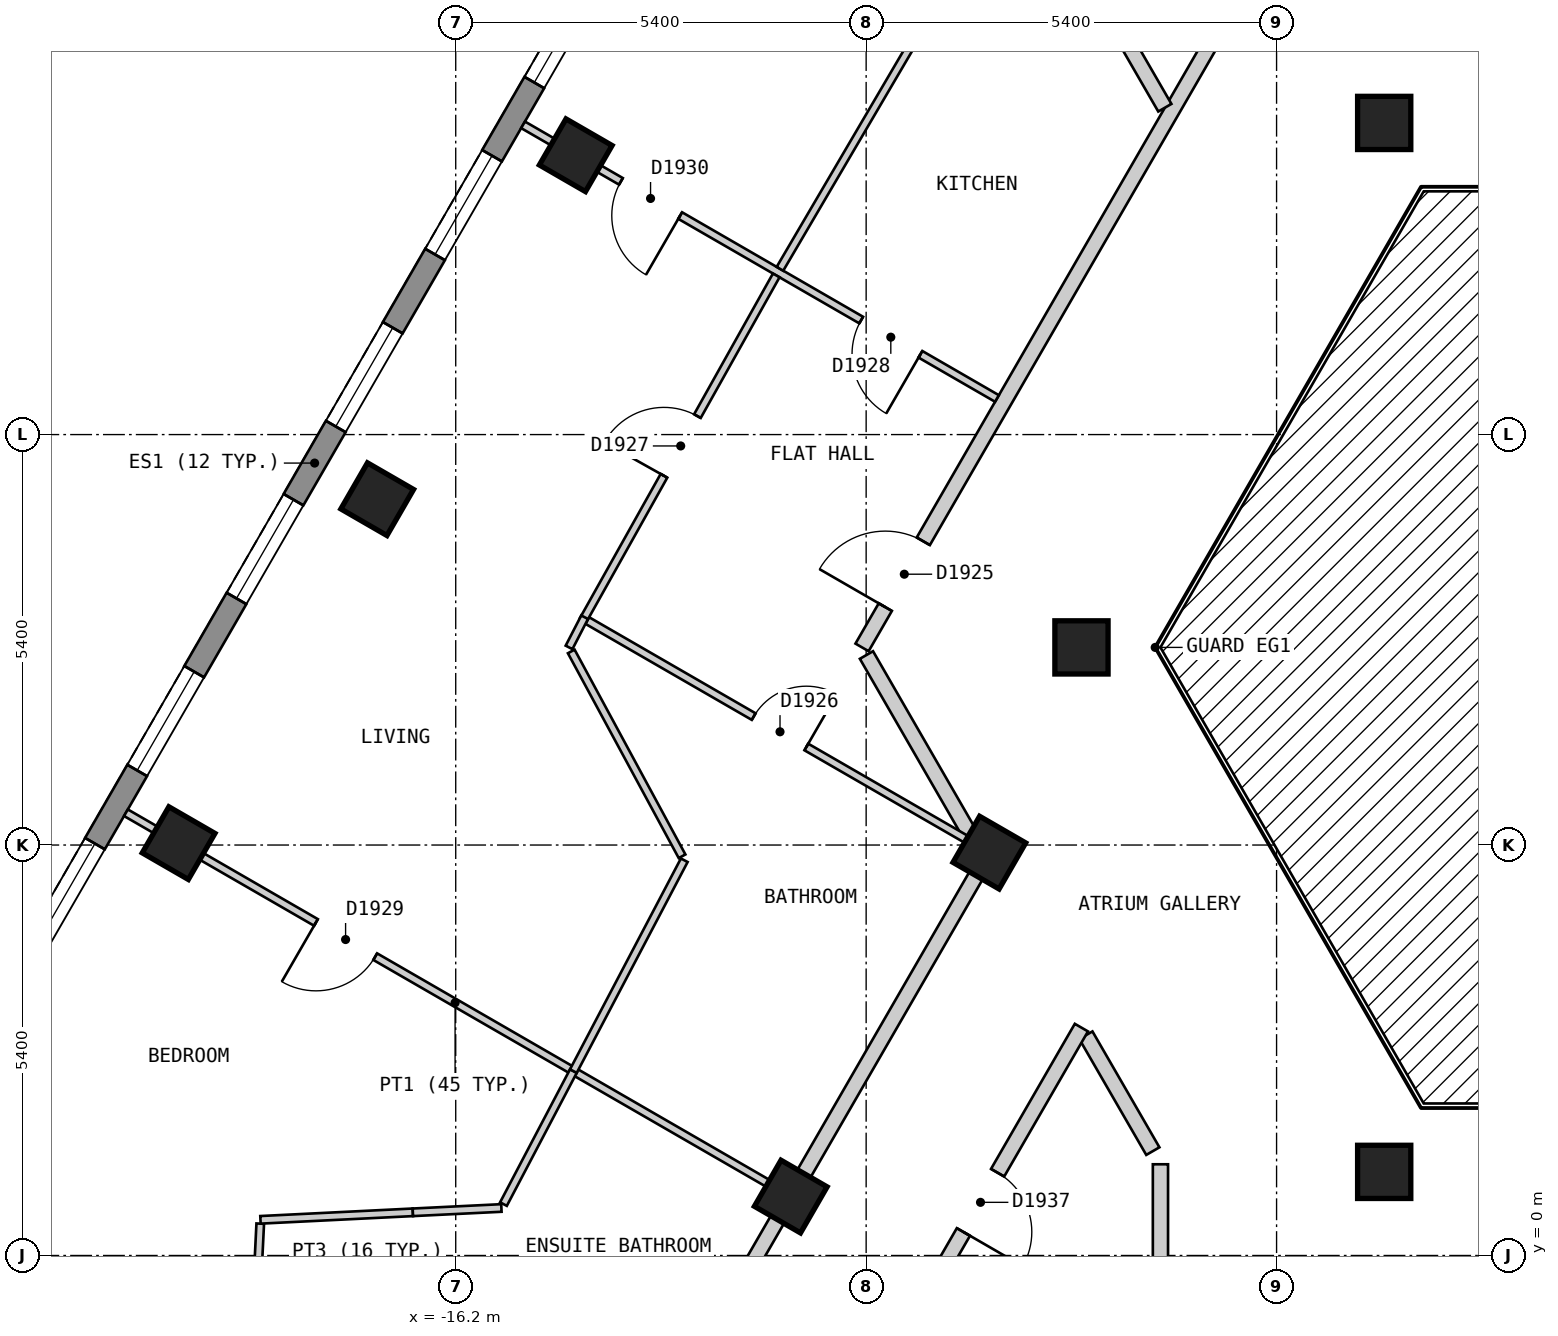
"""IFC4 building model, lengths in metres.
Left out: names, types, materials, properties, quantities, classifications, styles, units other than length and angle.
Written with IfcOpenShell. Run it as: python <this file> out.ifc"""

import sys

from ifc_helpers import new_model, si_unit, direction, frame, frame_2d, origin, origin_2d, place, context, subcontext, project, spatial, polyline, rectangle, outline, extrude, element, fill, save


model = new_model("IFC4")
c1 = context("Model", 3, precision=1e-05, world=origin(), true_north=direction((0.0, 1.0)))
c2 = subcontext(c1, "Body", "Model", "MODEL_VIEW")
j1 = project(units=[si_unit("LENGTHUNIT", "METRE"), si_unit("PLANEANGLEUNIT", "RADIAN")], contexts=[c1])
p1 = place(None, origin())
s1 = spatial("IfcSite", under=j1, at=p1, CompositionType="ELEMENT")
p2 = place(p1, origin())
s2 = spatial("IfcBuilding", under=s1, at=p2, CompositionType="ELEMENT")
p3 = place(p2, frame((0.0, 0.0, 226.8)))
s3 = spatial("IfcBuildingStorey", under=s2, at=p3, CompositionType="ELEMENT", Elevation=226.8)
for number, where, z_axis, x_axis in (
    (1, (-14.621, 14.475, 0.0), (0.0, 0.0, 1.0), (-0.5, -0.866, 0.0)),
    (2, (-17.233, 9.95, 0.0), (0.0, 0.0, 1.0), (-0.5, -0.866, 0.0)),
    (3, (-19.846, 5.425, 0.0), (0.0, 0.0, 1.0), (-0.5, -0.866, 0.0)),
    (4, (-3.984, 14.9, 0.0), (0.0, 0.0, 1.0), (1.0, 0.0, 0.0)),
    (5, (-7.967, 8.0, 0.0), (0.0, 0.0, 1.0), (1.0, 0.0, 0.0)),
    (6, (-9.179, 5.3, 0.0), (0.0, 0.0, 1.0), (-0.5, -0.866, 0.0)),
    (7, (-3.984, 1.1, 0.0), (0.0, 0.0, 1.0), (1.0, 0.0, 0.0)),
    (8, (-11.792, 0.775, 0.0), (0.0, 0.0, 1.0), (-0.5, -0.866, 0.0)),
):
    element("IfcColumn", number, at=place(p3, frame(where, z_axis=z_axis, x_axis=x_axis)), inside=s3, PredefinedType="COLUMN", context=c2, shape_type="SweptSolid", body=[
        extrude(rectangle(XDim=0.7, YDim=0.7, at=origin_2d()), origin(), (0.0, 0.0, 1.0), 3.0),
    ])
p4 = place(p3, frame((-12.514, 20.025, 0.0), z_axis=(0.0, 0.0, 1.0), x_axis=(-0.500003656944, -0.866023292436, 0.0)))
e9 = element("IfcWall", 9, at=p4, inside=s3, PredefinedType="SOLIDWALL", context=c2, shape_type="SweptSolid", body=[
    extrude(outline(polyline([(0.0, -0.15), (22.17, -0.15), (22.09, 0.15), (0.08, 0.15), (0.0, -0.15)])), origin(), (0.0, 0.0, 1.0), 2.7),
])
p5 = place(p4, frame((1.191, 0.0, 0.15)))
e10 = element("IfcOpeningElement", 10, at=p5, cuts=e9, PredefinedType="OPENING", context=c2, shape_type="SweptSolid", body=[
    extrude(rectangle(XDim=1.5, YDim=2.1, at=frame_2d((0.75, 1.05))), frame((0.0, 0.16, 0.0), z_axis=(0.0, -1.0, 0.0), x_axis=(1.0, 0.0, 0.0)), (0.0, 0.0, 1.0), 0.32),
])
p6 = place(p4, frame((3.804, 0.0, 0.15)))
e11 = element("IfcOpeningElement", 11, at=p6, cuts=e9, PredefinedType="OPENING", context=c2, shape_type="SweptSolid", body=[
    extrude(rectangle(XDim=1.5, YDim=2.1, at=frame_2d((0.75, 1.05))), frame((0.0, 0.16, 0.0), z_axis=(0.0, -1.0, 0.0), x_axis=(1.0, 0.0, 0.0)), (0.0, 0.0, 1.0), 0.32),
])
p7 = place(p4, frame((6.416, 0.0, 0.15)))
e12 = element("IfcOpeningElement", 12, at=p7, cuts=e9, PredefinedType="OPENING", context=c2, shape_type="SweptSolid", body=[
    extrude(rectangle(XDim=1.5, YDim=2.1, at=frame_2d((0.75, 1.05))), frame((0.0, 0.16, 0.0), z_axis=(0.0, -1.0, 0.0), x_axis=(1.0, 0.0, 0.0)), (0.0, 0.0, 1.0), 0.32),
])
p8 = place(p4, frame((9.029, 0.0, 0.15)))
e13 = element("IfcOpeningElement", 13, at=p8, cuts=e9, PredefinedType="OPENING", context=c2, shape_type="SweptSolid", body=[
    extrude(rectangle(XDim=1.5, YDim=2.1, at=frame_2d((0.75, 1.05))), frame((0.0, 0.16, 0.0), z_axis=(0.0, -1.0, 0.0), x_axis=(1.0, 0.0, 0.0)), (0.0, 0.0, 1.0), 0.32),
])
p9 = place(p4, frame((11.641, 0.0, 0.15)))
e14 = element("IfcOpeningElement", 14, at=p9, cuts=e9, PredefinedType="OPENING", context=c2, shape_type="SweptSolid", body=[
    extrude(rectangle(XDim=1.5, YDim=2.1, at=frame_2d((0.75, 1.05))), frame((0.0, 0.16, 0.0), z_axis=(0.0, -1.0, 0.0), x_axis=(1.0, 0.0, 0.0)), (0.0, 0.0, 1.0), 0.32),
])
p10 = place(p4, frame((14.254, 0.0, 0.15)))
e15 = element("IfcOpeningElement", 15, at=p10, cuts=e9, PredefinedType="OPENING", context=c2, shape_type="SweptSolid", body=[
    extrude(rectangle(XDim=1.5, YDim=2.1, at=frame_2d((0.75, 1.05))), frame((0.0, 0.16, 0.0), z_axis=(0.0, -1.0, 0.0), x_axis=(1.0, 0.0, 0.0)), (0.0, 0.0, 1.0), 0.32),
])
p11 = place(p4, frame((16.866, 0.0, 0.15)))
e16 = element("IfcOpeningElement", 16, at=p11, cuts=e9, PredefinedType="OPENING", context=c2, shape_type="SweptSolid", body=[
    extrude(rectangle(XDim=1.5, YDim=2.1, at=frame_2d((0.75, 1.05))), frame((0.0, 0.16, 0.0), z_axis=(0.0, -1.0, 0.0), x_axis=(1.0, 0.0, 0.0)), (0.0, 0.0, 1.0), 0.32),
])
p12 = place(p4, frame((19.479, 0.0, 0.15)))
e17 = element("IfcOpeningElement", 17, at=p12, cuts=e9, PredefinedType="OPENING", context=c2, shape_type="SweptSolid", body=[
    extrude(rectangle(XDim=1.5, YDim=2.1, at=frame_2d((0.75, 1.05))), frame((0.0, 0.16, 0.0), z_axis=(0.0, -1.0, 0.0), x_axis=(1.0, 0.0, 0.0)), (0.0, 0.0, 1.0), 0.32),
])
p13 = place(p3, frame((-10.796, 7.9, 0.0), z_axis=(0.0, 0.0, 1.0), x_axis=(0.499674397761, -0.866213308731, 0.0)))
e18 = element("IfcWall", 18, at=p13, inside=s3, PredefinedType="PARTITIONING", context=c2, shape_type="SweptSolid", body=[
    extrude(rectangle(XDim=2.785, YDim=0.2, at=frame_2d((1.393, 0.0))), origin(), (0.0, 0.0, 1.0), 2.7),
])
p14 = place(p3, frame((-7.909, 2.898, 0.0), z_axis=(0.0, 0.0, 1.0), x_axis=(0.50019444547, -0.865913111531, 0.0)))
e19 = element("IfcWall", 19, at=p14, inside=s3, PredefinedType="PARTITIONING", context=c2, shape_type="SweptSolid", body=[
    extrude(rectangle(XDim=1.761, YDim=0.2, at=frame_2d((0.88, 0.0))), origin(), (0.0, 0.0, 1.0), 2.7),
])
p15 = place(p3, frame((-10.623, -1.6, 0.0), z_axis=(0.0, 0.0, 1.0), x_axis=(0.500040865889, 0.866001808567, 0.0)))
e20 = element("IfcWall", 20, at=p15, inside=s3, PredefinedType="PARTITIONING", context=c2, shape_type="SweptSolid", body=[
    extrude(rectangle(XDim=5.31, YDim=0.2, at=frame_2d((2.655, 0.0))), origin(), (0.0, 0.0, 1.0), 2.7),
])
p16 = place(p15, frame((2.205, 0.0, 0.0)))
e21 = element("IfcOpeningElement", 21, at=p16, cuts=e20, PredefinedType="OPENING", context=c2, shape_type="SweptSolid", body=[
    extrude(rectangle(XDim=0.9, YDim=2.1, at=frame_2d((0.45, 1.05))), frame((0.0, 0.11, 0.0), z_axis=(0.0, -1.0, 0.0), x_axis=(1.0, 0.0, 0.0)), (0.0, 0.0, 1.0), 0.22),
])
p17 = place(p3, frame((-13.106, -1.5, 0.0), z_axis=(0.0, 0.0, 1.0), x_axis=(0.500025705601, 0.86601056214, 0.0)))
e22 = element("IfcWall", 22, at=p17, inside=s3, PredefinedType="PARTITIONING", context=c2, shape_type="SweptSolid", body=[
    extrude(rectangle(XDim=7.735, YDim=0.2, at=frame_2d((3.868, 0.0))), origin(), (0.0, 0.0, 1.0), 2.7),
])
p18 = place(p3, frame((-10.854, 8.0, 0.0), z_axis=(0.0, 0.0, 1.0), x_axis=(0.499997637144, 0.866026767976, 0.0)))
e23 = element("IfcWall", 23, at=p18, inside=s3, PredefinedType="PARTITIONING", context=c2, shape_type="SweptSolid", body=[
    extrude(rectangle(XDim=10.854, YDim=0.2, at=frame_2d((5.427, 0.0))), origin(), (0.0, 0.0, 1.0), 2.7),
])
p19 = place(p18, frame((0.612, 0.0, 0.0)))
e24 = element("IfcOpeningElement", 24, at=p19, cuts=e23, PredefinedType="OPENING", context=c2, shape_type="SweptSolid", body=[
    extrude(rectangle(XDim=1.0, YDim=2.1, at=frame_2d((0.5, 1.05))), frame((0.0, 0.11, 0.0), z_axis=(0.0, -1.0, 0.0), x_axis=(1.0, 0.0, 0.0)), (0.0, 0.0, 1.0), 0.22),
])
p20 = place(p3, frame((-6.928, -2.799, 0.0), z_axis=(0.0, 0.0, 1.0), x_axis=(0.0, 1.0, 0.0)))
e25 = element("IfcWall", 25, at=p20, inside=s3, PredefinedType="PARTITIONING", context=c2, shape_type="SweptSolid", body=[
    extrude(rectangle(XDim=3.999, YDim=0.2, at=frame_2d((2.0, 0.0))), origin(), (0.0, 0.0, 1.0), 2.7),
])
p21 = place(p3, frame((-14.68, 7.947, 0.0), z_axis=(0.0, 0.0, 1.0), x_axis=(0.475823637798, -0.879540712936, 0.0)))
e26 = element("IfcWall", 26, at=p21, inside=s3, PredefinedType="PARTITIONING", context=c2, shape_type="SweptSolid", body=[
    extrude(rectangle(XDim=3.064, YDim=0.1, at=frame_2d((1.532, 0.0))), origin(), (0.0, 0.0, 1.0), 2.7),
])
p22 = place(p3, frame((-20.539, 5.825, 0.0), z_axis=(0.0, 0.0, 1.0), x_axis=(0.866047370643, -0.499961950354, 0.0)))
e27 = element("IfcWall", 27, at=p22, inside=s3, PredefinedType="PARTITIONING", context=c2, shape_type="SweptSolid", body=[
    extrude(rectangle(XDim=10.001, YDim=0.1, at=frame_2d((5.0, 0.0))), origin(), (0.0, 0.0, 1.0), 2.7),
])
p23 = place(p22, frame((2.887, 0.0, 0.0)))
e28 = element("IfcOpeningElement", 28, at=p23, cuts=e27, PredefinedType="OPENING", context=c2, shape_type="SweptSolid", body=[
    extrude(rectangle(XDim=0.9, YDim=2.1, at=frame_2d((0.45, 1.05))), frame((0.0, 0.06, 0.0), z_axis=(0.0, -1.0, 0.0), x_axis=(1.0, 0.0, 0.0)), (0.0, 0.0, 1.0), 0.12),
])
p24 = place(p3, frame((-14.47, 8.354, 0.0), z_axis=(0.0, 0.0, 1.0), x_axis=(0.866067902578, -0.499926382705, 0.0)))
e29 = element("IfcWall", 29, at=p24, inside=s3, PredefinedType="PARTITIONING", context=c2, shape_type="SweptSolid", body=[
    extrude(rectangle(XDim=5.907, YDim=0.1, at=frame_2d((2.954, 0.0))), origin(), (0.0, 0.0, 1.0), 2.7),
])
p25 = place(p24, frame((2.529, 0.0, 0.0)))
e30 = element("IfcOpeningElement", 30, at=p25, cuts=e29, PredefinedType="OPENING", context=c2, shape_type="SweptSolid", body=[
    extrude(rectangle(XDim=0.8, YDim=2.1, at=frame_2d((0.4, 1.05))), frame((0.0, 0.06, 0.0), z_axis=(0.0, -1.0, 0.0), x_axis=(1.0, 0.0, 0.0)), (0.0, 0.0, 1.0), 0.12),
])
p26 = place(p3, frame((-15.314, 14.875, 0.0), z_axis=(0.0, 0.0, 1.0), x_axis=(0.866001485781, -0.500041424909, 0.0)))
e31 = element("IfcWall", 31, at=p26, inside=s3, PredefinedType="PARTITIONING", context=c2, shape_type="SweptSolid", body=[
    extrude(rectangle(XDim=7.2, YDim=0.1, at=frame_2d((3.6, 0.0))), origin(), (0.0, 0.0, 1.0), 2.7),
])
p27 = place(p26, frame((5.137, 0.0, 0.0)))
e32 = element("IfcOpeningElement", 32, at=p27, cuts=e31, PredefinedType="OPENING", context=c2, shape_type="SweptSolid", body=[
    extrude(rectangle(XDim=0.9, YDim=2.1, at=frame_2d((0.45, 1.05))), frame((0.0, 0.06, 0.0), z_axis=(0.0, -1.0, 0.0), x_axis=(1.0, 0.0, 0.0)), (0.0, 0.0, 1.0), 0.12),
])
p28 = place(p26, frame((1.487, 0.0, 0.0)))
e33 = element("IfcOpeningElement", 33, at=p28, cuts=e31, PredefinedType="OPENING", context=c2, shape_type="SweptSolid", body=[
    extrude(rectangle(XDim=0.9, YDim=2.1, at=frame_2d((0.45, 1.05))), frame((0.0, 0.06, 0.0), z_axis=(0.0, -1.0, 0.0), x_axis=(1.0, 0.0, 0.0)), (0.0, 0.0, 1.0), 0.12),
])
p29 = place(p3, frame((-11.934, 12.981, 0.0), z_axis=(0.0, 0.0, 1.0), x_axis=(0.506072703404, 0.862490822484, 0.0)))
e34 = element("IfcWall", 34, at=p29, inside=s3, PredefinedType="PARTITIONING", context=c2, shape_type="SweptSolid", body=[
    extrude(rectangle(XDim=8.212, YDim=0.1, at=frame_2d((4.106, 0.0))), origin(), (0.0, 0.0, 1.0), 2.7),
])
p30 = place(p3, frame((-15.572, 0.676, 0.0), z_axis=(0.0, 0.0, 1.0), x_axis=(0.465298498919, 0.885153832339, 0.0)))
e35 = element("IfcWall", 35, at=p30, inside=s3, PredefinedType="PARTITIONING", context=c2, shape_type="SweptSolid", body=[
    extrude(rectangle(XDim=1.977, YDim=0.1, at=frame_2d((0.989, 0.0))), origin(), (0.0, 0.0, 1.0), 2.7),
])
p31 = place(p3, frame((-14.522, 8.362, 0.0), z_axis=(0.0, 0.0, 1.0), x_axis=(0.488772229601, 0.872411432508, 0.0)))
e36 = element("IfcWall", 36, at=p31, inside=s3, PredefinedType="PARTITIONING", context=c2, shape_type="SweptSolid", body=[
    extrude(rectangle(XDim=5.195, YDim=0.1, at=frame_2d((2.597, 0.0))), origin(), (0.0, 0.0, 1.0), 2.7),
])
p32 = place(p31, frame((2.173, 0.0, 0.0)))
e37 = element("IfcOpeningElement", 37, at=p32, cuts=e36, PredefinedType="OPENING", context=c2, shape_type="SweptSolid", body=[
    extrude(rectangle(XDim=0.9, YDim=2.1, at=frame_2d((0.45, 1.05))), frame((0.0, 0.06, 0.0), z_axis=(0.0, -1.0, 0.0), x_axis=(1.0, 0.0, 0.0)), (0.0, 0.0, 1.0), 0.12),
])
p33 = place(p3, frame((-14.709, 8.0, 0.0), z_axis=(0.0, 0.0, 1.0), x_axis=(0.458976923864, 0.888448188337, 0.0)))
e38 = element("IfcWall", 38, at=p33, inside=s3, PredefinedType="PARTITIONING", context=c2, shape_type="SweptSolid", body=[
    extrude(rectangle(XDim=0.447, YDim=0.1, at=frame_2d((0.223, 0.0))), origin(), (0.0, 0.0, 1.0), 2.7),
])
p34 = place(p3, frame((-18.866, -1.5, 0.0), z_axis=(0.0, 0.0, 1.0), x_axis=(0.048923533446, 0.998802526967, 0.0)))
e39 = element("IfcWall", 39, at=p34, inside=s3, PredefinedType="PARTITIONING", context=c2, shape_type="SweptSolid", body=[
    extrude(rectangle(XDim=1.921, YDim=0.1, at=frame_2d((0.96, 0.0))), origin(), (0.0, 0.0, 1.0), 2.7),
])
p35 = place(p34, frame((0.536, 0.0, 0.0)))
e40 = element("IfcOpeningElement", 40, at=p35, cuts=e39, PredefinedType="OPENING", context=c2, shape_type="SweptSolid", body=[
    extrude(rectangle(XDim=0.8, YDim=2.1, at=frame_2d((0.4, 1.05))), frame((0.0, 0.06, 0.0), z_axis=(0.0, -1.0, 0.0), x_axis=(1.0, 0.0, 0.0)), (0.0, 0.0, 1.0), 0.12),
])
p36 = place(p3, frame((-18.769, 0.469, 0.0), z_axis=(0.0, 0.0, 1.0), x_axis=(0.998780383332, 0.049373534108, 0.0)))
e41 = element("IfcWall", 41, at=p36, inside=s3, PredefinedType="PARTITIONING", context=c2, shape_type="SweptSolid", body=[
    extrude(rectangle(XDim=2.008, YDim=0.1, at=frame_2d((1.004, 0.0))), origin(), (0.0, 0.0, 1.0), 2.7),
])
p37 = place(p3, frame((-16.764, 0.568, 0.0), z_axis=(0.0, 0.0, 1.0), x_axis=(0.998809616198, 0.048778587419, 0.0)))
e42 = element("IfcWall", 42, at=p37, inside=s3, PredefinedType="PARTITIONING", context=c2, shape_type="SweptSolid", body=[
    extrude(rectangle(XDim=1.166, YDim=0.1, at=frame_2d((0.583, 0.0))), origin(), (0.0, 0.0, 1.0), 2.7),
])
p38 = place(p3, frame((-7.578, 16.325, 0.0), z_axis=(0.0, 0.0, 1.0), x_axis=(0.500314976313, -0.865843475737, 0.0)))
e43 = element("IfcWall", 43, at=p38, inside=s3, PredefinedType="PARTITIONING", context=c2, shape_type="SweptSolid", body=[
    extrude(rectangle(XDim=1.415, YDim=0.2, at=frame_2d((0.707, 0.0))), origin(), (0.0, 0.0, 1.0), 2.7),
])
p39 = place(p3, frame((-14.652, 2.426, 0.0), z_axis=(0.0, 0.0, 1.0), x_axis=(0.465502421984, 0.885046606189, 0.0)))
e44 = element("IfcWall", 44, at=p39, inside=s3, PredefinedType="PARTITIONING", context=c2, shape_type="SweptSolid", body=[
    extrude(rectangle(XDim=3.134, YDim=0.1, at=frame_2d((1.567, 0.0))), origin(), (0.0, 0.0, 1.0), 2.7),
])
p40 = place(p6, origin())
e45 = element("IfcWindow", 45, at=p40, inside=s3, PartitioningType="SINGLE_PANEL", PredefinedType="WINDOW", context=c2, shape_type="SweptSolid", body=[
    extrude(rectangle(XDim=1.5, YDim=2.1, at=frame_2d((0.75, 1.05))), frame((0.0, 0.03, 0.0), z_axis=(0.0, -1.0, 0.0), x_axis=(1.0, 0.0, 0.0)), (0.0, 0.0, 1.0), 0.06),
])
fill(e11, e45)
p41 = place(p7, origin())
e46 = element("IfcWindow", 46, at=p41, inside=s3, PartitioningType="SINGLE_PANEL", PredefinedType="WINDOW", context=c2, shape_type="SweptSolid", body=[
    extrude(rectangle(XDim=1.5, YDim=2.1, at=frame_2d((0.75, 1.05))), frame((0.0, 0.03, 0.0), z_axis=(0.0, -1.0, 0.0), x_axis=(1.0, 0.0, 0.0)), (0.0, 0.0, 1.0), 0.06),
])
fill(e12, e46)
p42 = place(p8, origin())
e47 = element("IfcWindow", 47, at=p42, inside=s3, PartitioningType="SINGLE_PANEL", PredefinedType="WINDOW", context=c2, shape_type="SweptSolid", body=[
    extrude(rectangle(XDim=1.5, YDim=2.1, at=frame_2d((0.75, 1.05))), frame((0.0, 0.03, 0.0), z_axis=(0.0, -1.0, 0.0), x_axis=(1.0, 0.0, 0.0)), (0.0, 0.0, 1.0), 0.06),
])
fill(e13, e47)
p43 = place(p9, origin())
e48 = element("IfcWindow", 48, at=p43, inside=s3, PartitioningType="SINGLE_PANEL", PredefinedType="WINDOW", context=c2, shape_type="SweptSolid", body=[
    extrude(rectangle(XDim=1.5, YDim=2.1, at=frame_2d((0.75, 1.05))), frame((0.0, 0.03, 0.0), z_axis=(0.0, -1.0, 0.0), x_axis=(1.0, 0.0, 0.0)), (0.0, 0.0, 1.0), 0.06),
])
fill(e14, e48)
p44 = place(p10, origin())
e49 = element("IfcWindow", 49, at=p44, inside=s3, PartitioningType="SINGLE_PANEL", PredefinedType="WINDOW", context=c2, shape_type="SweptSolid", body=[
    extrude(rectangle(XDim=1.5, YDim=2.1, at=frame_2d((0.75, 1.05))), frame((0.0, 0.03, 0.0), z_axis=(0.0, -1.0, 0.0), x_axis=(1.0, 0.0, 0.0)), (0.0, 0.0, 1.0), 0.06),
])
fill(e15, e49)
p45 = place(p11, origin())
e50 = element("IfcWindow", 50, at=p45, inside=s3, PartitioningType="SINGLE_PANEL", PredefinedType="WINDOW", context=c2, shape_type="SweptSolid", body=[
    extrude(rectangle(XDim=1.5, YDim=2.1, at=frame_2d((0.75, 1.05))), frame((0.0, 0.03, 0.0), z_axis=(0.0, -1.0, 0.0), x_axis=(1.0, 0.0, 0.0)), (0.0, 0.0, 1.0), 0.06),
])
fill(e16, e50)
p46 = place(p19, origin())
e51 = element("IfcDoor", 51, at=p46, inside=s3, OperationType="SINGLE_SWING_LEFT", PredefinedType="DOOR", context=c2, shape_type="SweptSolid", body=[
    extrude(rectangle(XDim=1.0, YDim=2.1, at=frame_2d((0.5, 1.05))), frame((0.0, 0.025, 0.0), z_axis=(0.0, -1.0, 0.0), x_axis=(1.0, 0.0, 0.0)), (0.0, 0.0, 1.0), 0.05),
])
fill(e24, e51)
p47 = place(p25, origin())
e52 = element("IfcDoor", 52, at=p47, inside=s3, OperationType="SINGLE_SWING_RIGHT", PredefinedType="DOOR", context=c2, shape_type="SweptSolid", body=[
    extrude(rectangle(XDim=0.8, YDim=2.1, at=frame_2d((0.4, 1.05))), frame((0.0, 0.025, 0.0), z_axis=(0.0, -1.0, 0.0), x_axis=(1.0, 0.0, 0.0)), (0.0, 0.0, 1.0), 0.05),
])
fill(e30, e52)
p48 = place(p32, origin())
e53 = element("IfcDoor", 53, at=p48, inside=s3, OperationType="SINGLE_SWING_LEFT", PredefinedType="DOOR", context=c2, shape_type="SweptSolid", body=[
    extrude(rectangle(XDim=0.9, YDim=2.1, at=frame_2d((0.45, 1.05))), frame((0.0, 0.025, 0.0), z_axis=(0.0, -1.0, 0.0), x_axis=(1.0, 0.0, 0.0)), (0.0, 0.0, 1.0), 0.05),
])
fill(e37, e53)
p49 = place(p27, origin())
e54 = element("IfcDoor", 54, at=p49, inside=s3, OperationType="SINGLE_SWING_RIGHT", PredefinedType="DOOR", context=c2, shape_type="SweptSolid", body=[
    extrude(rectangle(XDim=0.9, YDim=2.1, at=frame_2d((0.45, 1.05))), frame((0.0, 0.025, 0.0), z_axis=(0.0, -1.0, 0.0), x_axis=(1.0, 0.0, 0.0)), (0.0, 0.0, 1.0), 0.05),
])
fill(e32, e54)
p50 = place(p23, origin())
e55 = element("IfcDoor", 55, at=p50, inside=s3, OperationType="SINGLE_SWING_LEFT", PredefinedType="DOOR", context=c2, shape_type="SweptSolid", body=[
    extrude(rectangle(XDim=0.9, YDim=2.1, at=frame_2d((0.45, 1.05))), frame((0.0, 0.025, 0.0), z_axis=(0.0, -1.0, 0.0), x_axis=(1.0, 0.0, 0.0)), (0.0, 0.0, 1.0), 0.05),
])
fill(e28, e55)
p51 = place(p28, origin())
e56 = element("IfcDoor", 56, at=p51, inside=s3, OperationType="SINGLE_SWING_RIGHT", PredefinedType="DOOR", context=c2, shape_type="SweptSolid", body=[
    extrude(rectangle(XDim=0.9, YDim=2.1, at=frame_2d((0.45, 1.05))), frame((0.0, 0.025, 0.0), z_axis=(0.0, -1.0, 0.0), x_axis=(1.0, 0.0, 0.0)), (0.0, 0.0, 1.0), 0.05),
])
fill(e33, e56)
p52 = place(p16, origin())
e57 = element("IfcDoor", 57, at=p52, inside=s3, OperationType="SINGLE_SWING_LEFT", PredefinedType="DOOR", context=c2, shape_type="SweptSolid", body=[
    extrude(rectangle(XDim=0.9, YDim=2.1, at=frame_2d((0.45, 1.05))), frame((0.0, 0.025, 0.0), z_axis=(0.0, -1.0, 0.0), x_axis=(1.0, 0.0, 0.0)), (0.0, 0.0, 1.0), 0.05),
])
fill(e21, e57)
save(model, sys.argv[1])
